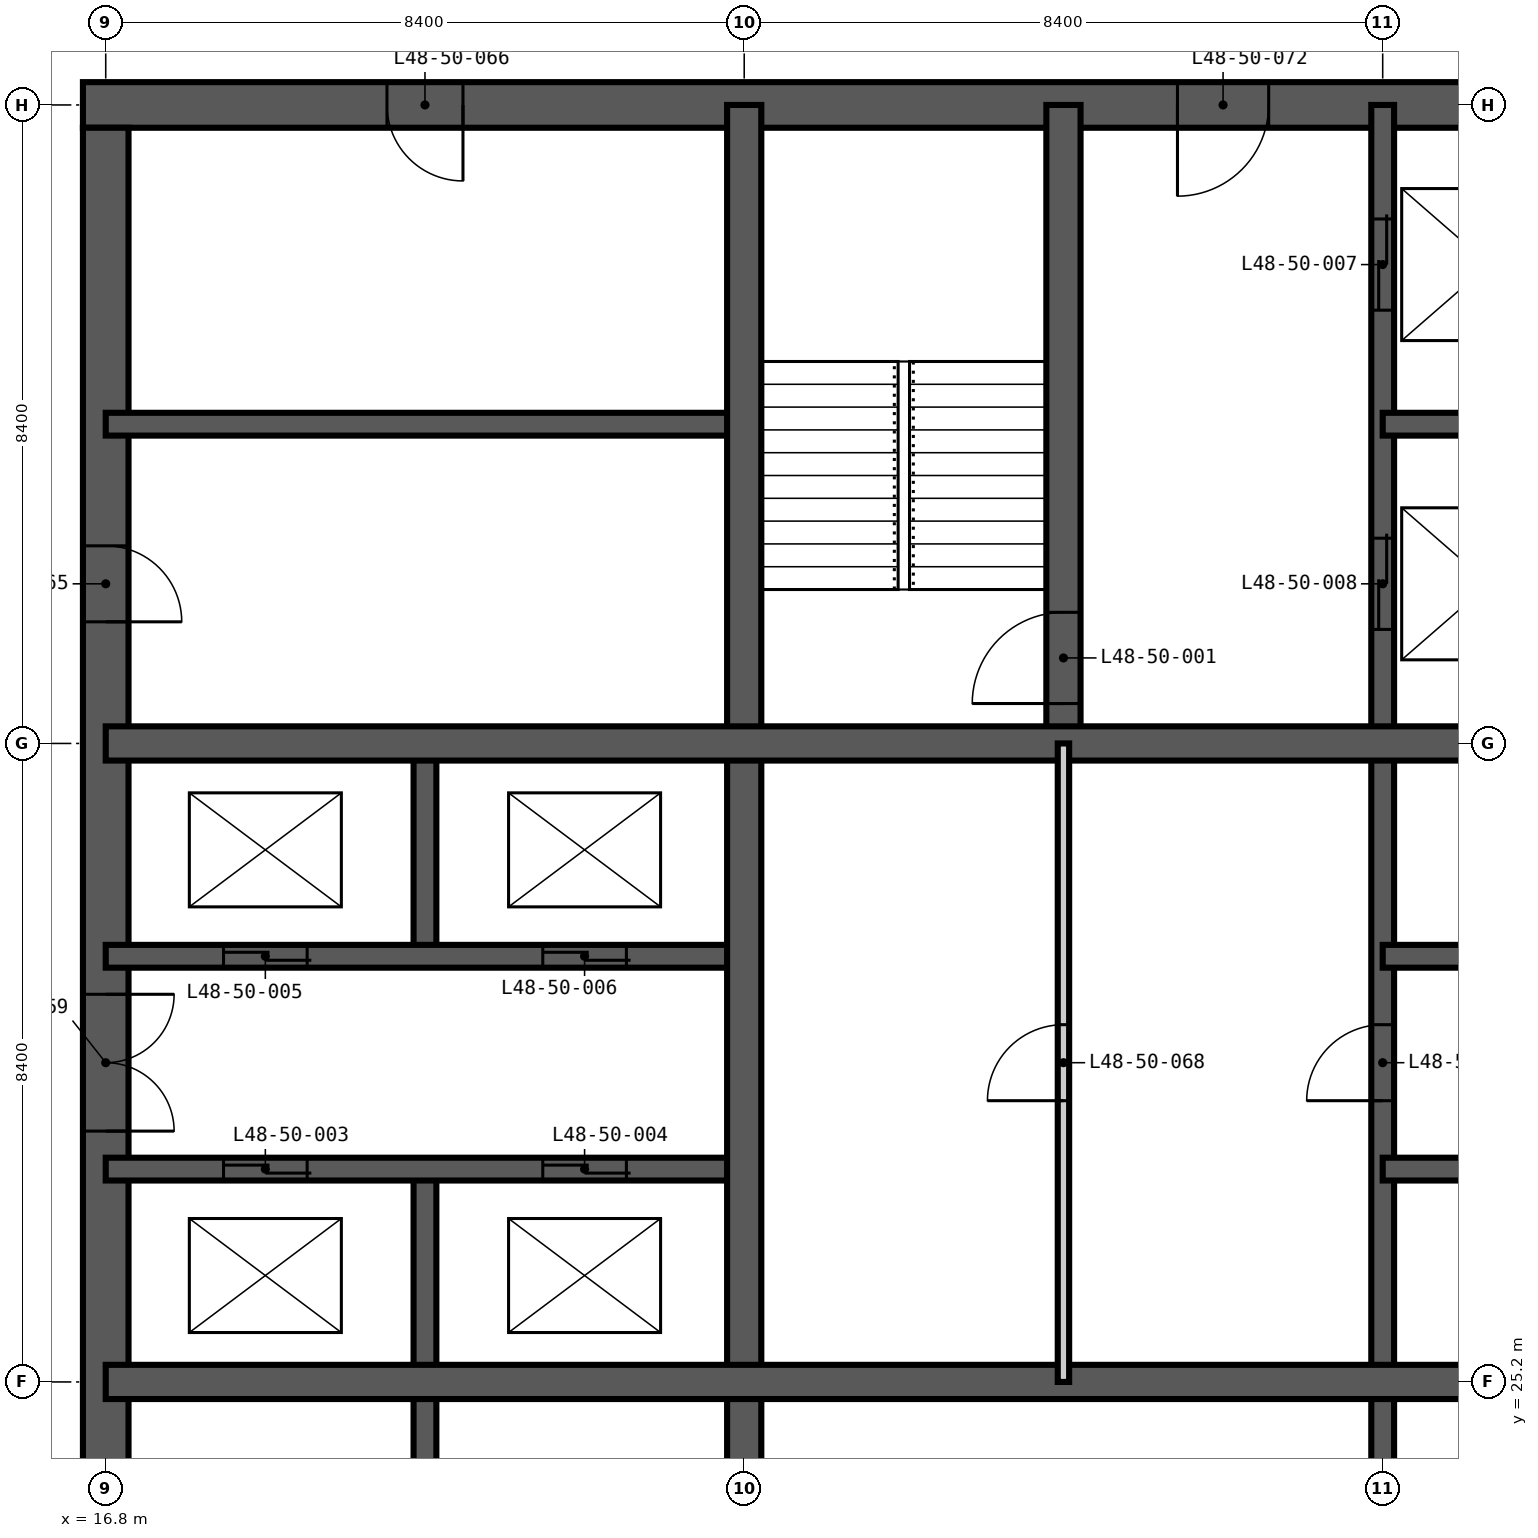
"""IFC4 building model, lengths in metres.
Left out: names, types, materials, properties, quantities, classifications, styles, units other than length and angle.
Written with IfcOpenShell. Run it as: python <this file> out.ifc"""

import sys

from ifc_helpers import new_model, si_unit, direction, frame, frame_2d, origin, place, context, subcontext, project, spatial, rectangle, extrude, element, fill, save


model = new_model("IFC4")
c1 = context("Model", 3, precision=1e-05, world=origin(), true_north=direction((0.0, 1.0)))
c2 = subcontext(c1, "Body", "Model", "MODEL_VIEW")
j1 = project(units=[si_unit("LENGTHUNIT", "METRE"), si_unit("PLANEANGLEUNIT", "RADIAN")], contexts=[c1])
p1 = place(None, origin())
s1 = spatial("IfcSite", under=j1, at=p1, CompositionType="ELEMENT")
p2 = place(p1, origin())
s2 = spatial("IfcBuilding", under=s1, at=p2, CompositionType="ELEMENT")
p3 = place(p2, frame((0.0, 0.0, 187.8)))
s3 = spatial("IfcBuildingStorey", under=s2, at=p3, CompositionType="ELEMENT", Elevation=187.8)
p4 = place(p3, frame((42.3, 42.0, -0.35), z_axis=(0.0, 0.0, 1.0), x_axis=(-1.0, 0.0, 0.0)))
e1 = element("IfcWall", 1, at=p4, inside=s3, PredefinedType="SHEAR", context=c2, shape_type="SweptSolid", body=[
    extrude(rectangle(XDim=25.8, YDim=0.6, at=frame_2d((12.9, 0.0))), origin(), (0.0, 0.0, 1.0), 3.6),
])
p5 = place(p4, frame((20.8, 0.0, 0.35)))
e2 = element("IfcOpeningElement", 2, at=p5, cuts=e1, PredefinedType="OPENING", context=c2, shape_type="SweptSolid", body=[
    extrude(rectangle(XDim=1.0, YDim=2.1, at=frame_2d((0.5, 1.05))), frame((0.0, 0.31, 0.0), z_axis=(0.0, -1.0, 0.0), x_axis=(1.0, 0.0, 0.0)), (0.0, 0.0, 1.0), 0.62),
])
p6 = place(p4, frame((10.2, 0.0, 0.35)))
e3 = element("IfcOpeningElement", 3, at=p6, cuts=e1, PredefinedType="OPENING", context=c2, shape_type="SweptSolid", body=[
    extrude(rectangle(XDim=1.2, YDim=2.2, at=frame_2d((0.6, 1.1))), frame((0.0, 0.31, 0.0), z_axis=(0.0, -1.0, 0.0), x_axis=(1.0, 0.0, 0.0)), (0.0, 0.0, 1.0), 0.62),
])
p7 = place(p3, frame((16.8, 41.7, -0.35), z_axis=(0.0, 0.0, 1.0), x_axis=(0.0, -1.0, 0.0)))
e4 = element("IfcWall", 4, at=p7, inside=s3, PredefinedType="SHEAR", context=c2, shape_type="SweptSolid", body=[
    extrude(rectangle(XDim=24.6, YDim=0.6, at=frame_2d((12.3, 0.0))), origin(), (0.0, 0.0, 1.0), 3.6),
])
p8 = place(p7, frame((11.4, 0.0, 0.35)))
e5 = element("IfcOpeningElement", 5, at=p8, cuts=e4, PredefinedType="OPENING", context=c2, shape_type="SweptSolid", body=[
    extrude(rectangle(XDim=1.8, YDim=2.2, at=frame_2d((0.9, 1.1))), frame((0.0, 0.31, 0.0), z_axis=(0.0, -1.0, 0.0), x_axis=(1.0, 0.0, 0.0)), (0.0, 0.0, 1.0), 0.62),
])
p9 = place(p7, frame((20.2, 0.0, 0.35)))
e6 = element("IfcOpeningElement", 6, at=p9, cuts=e4, PredefinedType="OPENING", context=c2, shape_type="SweptSolid", body=[
    extrude(rectangle(XDim=1.0, YDim=2.1, at=frame_2d((0.5, 1.05))), frame((0.0, 0.31, 0.0), z_axis=(0.0, -1.0, 0.0), x_axis=(1.0, 0.0, 0.0)), (0.0, 0.0, 1.0), 0.62),
])
p10 = place(p7, frame((5.5, 0.0, 0.35)))
e7 = element("IfcOpeningElement", 7, at=p10, cuts=e4, PredefinedType="OPENING", context=c2, shape_type="SweptSolid", body=[
    extrude(rectangle(XDim=1.0, YDim=2.1, at=frame_2d((0.5, 1.05))), frame((0.0, 0.31, 0.0), z_axis=(0.0, -1.0, 0.0), x_axis=(1.0, 0.0, 0.0)), (0.0, 0.0, 1.0), 0.62),
])
p11 = place(p3, frame((21.0, 22.4, -0.35), z_axis=(0.0, 0.0, 1.0), x_axis=(0.0, 1.0, 0.0)))
e8 = element("IfcWall", 8, at=p11, inside=s3, PredefinedType="SHEAR", context=c2, shape_type="SweptSolid", body=[
    extrude(rectangle(XDim=5.6, YDim=0.3, at=frame_2d((2.8, 0.0))), origin(), (0.0, 0.0, 1.0), 3.6),
])
p12 = place(p3, frame((21.0, 30.8, -0.35), z_axis=(0.0, 0.0, 1.0), x_axis=(0.0, 1.0, 0.0)))
e9 = element("IfcWall", 9, at=p12, inside=s3, PredefinedType="SHEAR", context=c2, shape_type="SweptSolid", body=[
    extrude(rectangle(XDim=2.8, YDim=0.3, at=frame_2d((1.4, 0.0))), origin(), (0.0, 0.0, 1.0), 3.6),
])
p13 = place(p3, frame((33.6, 16.8, -0.35), z_axis=(0.0, 0.0, 1.0), x_axis=(0.0, 1.0, 0.0)))
e10 = element("IfcWall", 10, at=p13, inside=s3, PredefinedType="SHEAR", context=c2, shape_type="SweptSolid", body=[
    extrude(rectangle(XDim=25.2, YDim=0.3, at=frame_2d((12.6, 0.0))), origin(), (0.0, 0.0, 1.0), 3.6),
])
p14 = place(p13, frame((22.5, 0.0, 0.35)))
e11 = element("IfcOpeningElement", 11, at=p14, cuts=e10, PredefinedType="OPENING", context=c2, shape_type="SweptSolid", body=[
    extrude(rectangle(XDim=1.2, YDim=2.2, at=frame_2d((0.6, 1.1))), frame((0.0, 0.16, 0.0), z_axis=(0.0, -1.0, 0.0), x_axis=(1.0, 0.0, 0.0)), (0.0, 0.0, 1.0), 0.32),
])
p15 = place(p13, frame((18.3, 0.0, 0.35)))
e12 = element("IfcOpeningElement", 12, at=p15, cuts=e10, PredefinedType="OPENING", context=c2, shape_type="SweptSolid", body=[
    extrude(rectangle(XDim=1.2, YDim=2.2, at=frame_2d((0.6, 1.1))), frame((0.0, 0.16, 0.0), z_axis=(0.0, -1.0, 0.0), x_axis=(1.0, 0.0, 0.0)), (0.0, 0.0, 1.0), 0.32),
])
p16 = place(p13, frame((12.1, 0.0, 0.35)))
e13 = element("IfcOpeningElement", 13, at=p16, cuts=e10, PredefinedType="OPENING", context=c2, shape_type="SweptSolid", body=[
    extrude(rectangle(XDim=1.0, YDim=2.1, at=frame_2d((0.5, 1.05))), frame((0.0, 0.16, 0.0), z_axis=(0.0, -1.0, 0.0), x_axis=(1.0, 0.0, 0.0)), (0.0, 0.0, 1.0), 0.32),
])
p17 = place(p3, frame((16.8, 28.0, -0.35), z_axis=(0.0, 0.0, 1.0), x_axis=(1.0, 0.0, 0.0)))
e14 = element("IfcWall", 14, at=p17, inside=s3, PredefinedType="SHEAR", context=c2, shape_type="SweptSolid", body=[
    extrude(rectangle(XDim=8.4, YDim=0.3, at=frame_2d((4.2, 0.0))), origin(), (0.0, 0.0, 1.0), 3.6),
])
p18 = place(p17, frame((1.55, 0.0, 0.35)))
e15 = element("IfcOpeningElement", 15, at=p18, cuts=e14, PredefinedType="OPENING", context=c2, shape_type="SweptSolid", body=[
    extrude(rectangle(XDim=1.1, YDim=2.2, at=frame_2d((0.55, 1.1))), frame((0.0, 0.16, 0.0), z_axis=(0.0, -1.0, 0.0), x_axis=(1.0, 0.0, 0.0)), (0.0, 0.0, 1.0), 0.32),
])
p19 = place(p17, frame((5.75, 0.0, 0.35)))
e16 = element("IfcOpeningElement", 16, at=p19, cuts=e14, PredefinedType="OPENING", context=c2, shape_type="SweptSolid", body=[
    extrude(rectangle(XDim=1.1, YDim=2.2, at=frame_2d((0.55, 1.1))), frame((0.0, 0.16, 0.0), z_axis=(0.0, -1.0, 0.0), x_axis=(1.0, 0.0, 0.0)), (0.0, 0.0, 1.0), 0.32),
])
p20 = place(p3, frame((33.6, 28.0, -0.35), z_axis=(0.0, 0.0, 1.0), x_axis=(1.0, 0.0, 0.0)))
e17 = element("IfcWall", 17, at=p20, inside=s3, PredefinedType="SHEAR", context=c2, shape_type="SweptSolid", body=[
    extrude(rectangle(XDim=8.4, YDim=0.3, at=frame_2d((4.2, 0.0))), origin(), (0.0, 0.0, 1.0), 3.6),
])
p21 = place(p20, frame((1.6, 0.0, 0.35)))
e18 = element("IfcOpeningElement", 18, at=p21, cuts=e17, PredefinedType="OPENING", context=c2, shape_type="SweptSolid", body=[
    extrude(rectangle(XDim=1.0, YDim=2.1, at=frame_2d((0.5, 1.05))), frame((0.0, 0.16, 0.0), z_axis=(0.0, -1.0, 0.0), x_axis=(1.0, 0.0, 0.0)), (0.0, 0.0, 1.0), 0.32),
])
p22 = place(p20, frame((4.6, 0.0, 0.35)))
e19 = element("IfcOpeningElement", 19, at=p22, cuts=e17, PredefinedType="OPENING", context=c2, shape_type="SweptSolid", body=[
    extrude(rectangle(XDim=1.0, YDim=2.1, at=frame_2d((0.5, 1.05))), frame((0.0, 0.16, 0.0), z_axis=(0.0, -1.0, 0.0), x_axis=(1.0, 0.0, 0.0)), (0.0, 0.0, 1.0), 0.32),
])
p23 = place(p3, frame((16.8, 30.8, -0.35), z_axis=(0.0, 0.0, 1.0), x_axis=(1.0, 0.0, 0.0)))
e20 = element("IfcWall", 20, at=p23, inside=s3, PredefinedType="SHEAR", context=c2, shape_type="SweptSolid", body=[
    extrude(rectangle(XDim=8.4, YDim=0.3, at=frame_2d((4.2, 0.0))), origin(), (0.0, 0.0, 1.0), 3.6),
])
p24 = place(p23, frame((1.55, 0.0, 0.35)))
e21 = element("IfcOpeningElement", 21, at=p24, cuts=e20, PredefinedType="OPENING", context=c2, shape_type="SweptSolid", body=[
    extrude(rectangle(XDim=1.1, YDim=2.2, at=frame_2d((0.55, 1.1))), frame((0.0, 0.16, 0.0), z_axis=(0.0, -1.0, 0.0), x_axis=(1.0, 0.0, 0.0)), (0.0, 0.0, 1.0), 0.32),
])
p25 = place(p23, frame((5.75, 0.0, 0.35)))
e22 = element("IfcOpeningElement", 22, at=p25, cuts=e20, PredefinedType="OPENING", context=c2, shape_type="SweptSolid", body=[
    extrude(rectangle(XDim=1.1, YDim=2.2, at=frame_2d((0.55, 1.1))), frame((0.0, 0.16, 0.0), z_axis=(0.0, -1.0, 0.0), x_axis=(1.0, 0.0, 0.0)), (0.0, 0.0, 1.0), 0.32),
])
for number, where, z_axis, x_axis in (
    (23, (33.6, 30.8, -0.35), (0.0, 0.0, 1.0), (1.0, 0.0, 0.0)),
    (24, (16.8, 37.8, -0.35), (0.0, 0.0, 1.0), (1.0, 0.0, 0.0)),
):
    element("IfcWall", number, at=place(p3, frame(where, z_axis=z_axis, x_axis=x_axis)), inside=s3, PredefinedType="SHEAR", context=c2, shape_type="SweptSolid", body=[
        extrude(rectangle(XDim=8.4, YDim=0.3, at=frame_2d((4.2, 0.0))), origin(), (0.0, 0.0, 1.0), 3.6),
    ])
p26 = place(p3, frame((33.6, 37.8, -0.35), z_axis=(0.0, 0.0, 1.0), x_axis=(1.0, 0.0, 0.0)))
e25 = element("IfcWall", 25, at=p26, inside=s3, PredefinedType="SHEAR", context=c2, shape_type="SweptSolid", body=[
    extrude(rectangle(XDim=2.8, YDim=0.3, at=frame_2d((1.4, 0.0))), origin(), (0.0, 0.0, 1.0), 3.6),
])
p27 = place(p3, frame((25.2, 16.8, -0.35), z_axis=(0.0, 0.0, 1.0), x_axis=(0.0, 1.0, 0.0)))
e26 = element("IfcWall", 26, at=p27, inside=s3, PredefinedType="SHEAR", context=c2, shape_type="SweptSolid", body=[
    extrude(rectangle(XDim=25.2, YDim=0.45, at=frame_2d((12.6, 0.0))), origin(), (0.0, 0.0, 1.0), 3.6),
])
p28 = place(p3, frame((29.4, 33.6, -0.35), z_axis=(0.0, 0.0, 1.0), x_axis=(0.0, 1.0, 0.0)))
e27 = element("IfcWall", 27, at=p28, inside=s3, PredefinedType="SHEAR", context=c2, shape_type="SweptSolid", body=[
    extrude(rectangle(XDim=8.4, YDim=0.45, at=frame_2d((4.2, 0.0))), origin(), (0.0, 0.0, 1.0), 3.6),
])
p29 = place(p28, frame((0.525, 0.0, 0.35)))
e28 = element("IfcOpeningElement", 28, at=p29, cuts=e27, PredefinedType="OPENING", context=c2, shape_type="SweptSolid", body=[
    extrude(rectangle(XDim=1.2, YDim=2.2, at=frame_2d((0.6, 1.1))), frame((0.0, 0.235, 0.0), z_axis=(0.0, -1.0, 0.0), x_axis=(1.0, 0.0, 0.0)), (0.0, 0.0, 1.0), 0.47),
])
for number, where, z_axis, x_axis in (
    (29, (16.8, 25.2, -0.35), (0.0, 0.0, 1.0), (1.0, 0.0, 0.0)),
    (30, (16.8, 33.6, -0.35), (0.0, 0.0, 1.0), (1.0, 0.0, 0.0)),
):
    element("IfcWall", number, at=place(p3, frame(where, z_axis=z_axis, x_axis=x_axis)), inside=s3, PredefinedType="SHEAR", context=c2, shape_type="SweptSolid", body=[
        extrude(rectangle(XDim=25.2, YDim=0.45, at=frame_2d((12.6, 0.0))), origin(), (0.0, 0.0, 1.0), 3.6),
    ])
p30 = place(p3, frame((29.4, 25.2, 0.0), z_axis=(0.0, 0.0, 1.0), x_axis=(0.0, 1.0, 0.0)))
e31 = element("IfcWall", 31, at=p30, inside=s3, PredefinedType="PARTITIONING", context=c2, shape_type="SweptSolid", body=[
    extrude(rectangle(XDim=8.4, YDim=0.15, at=frame_2d((4.2, 0.0))), origin(), (0.0, 0.0, 1.0), 3.25),
])
p31 = place(p30, frame((3.7, 0.0, 0.0)))
e32 = element("IfcOpeningElement", 32, at=p31, cuts=e31, PredefinedType="OPENING", context=c2, shape_type="SweptSolid", body=[
    extrude(rectangle(XDim=1.0, YDim=2.1, at=frame_2d((0.5, 1.05))), frame((0.0, 0.085, 0.0), z_axis=(0.0, -1.0, 0.0), x_axis=(1.0, 0.0, 0.0)), (0.0, 0.0, 1.0), 0.17),
])
p32 = place(p29, origin())
e33 = element("IfcDoor", 33, at=p32, inside=s3, OperationType="SINGLE_SWING_LEFT", PredefinedType="DOOR", context=c2, shape_type="SweptSolid", body=[
    extrude(rectangle(XDim=1.2, YDim=2.2, at=frame_2d((0.6, 1.1))), frame((0.0, 0.025, 0.0), z_axis=(0.0, -1.0, 0.0), x_axis=(1.0, 0.0, 0.0)), (0.0, 0.0, 1.0), 0.05),
])
fill(e28, e33)
p33 = place(p18, origin())
e34 = element("IfcDoor", 34, at=p33, inside=s3, OperationType="DOUBLE_DOOR_SLIDING", PredefinedType="DOOR", context=c2, shape_type="SweptSolid", body=[
    extrude(rectangle(XDim=1.1, YDim=2.2, at=frame_2d((0.55, 1.1))), frame((0.0, 0.025, 0.0), z_axis=(0.0, -1.0, 0.0), x_axis=(1.0, 0.0, 0.0)), (0.0, 0.0, 1.0), 0.05),
])
fill(e15, e34)
p34 = place(p19, origin())
e35 = element("IfcDoor", 35, at=p34, inside=s3, OperationType="DOUBLE_DOOR_SLIDING", PredefinedType="DOOR", context=c2, shape_type="SweptSolid", body=[
    extrude(rectangle(XDim=1.1, YDim=2.2, at=frame_2d((0.55, 1.1))), frame((0.0, 0.025, 0.0), z_axis=(0.0, -1.0, 0.0), x_axis=(1.0, 0.0, 0.0)), (0.0, 0.0, 1.0), 0.05),
])
fill(e16, e35)
p35 = place(p24, origin())
e36 = element("IfcDoor", 36, at=p35, inside=s3, OperationType="DOUBLE_DOOR_SLIDING", PredefinedType="DOOR", context=c2, shape_type="SweptSolid", body=[
    extrude(rectangle(XDim=1.1, YDim=2.2, at=frame_2d((0.55, 1.1))), frame((0.0, 0.025, 0.0), z_axis=(0.0, -1.0, 0.0), x_axis=(1.0, 0.0, 0.0)), (0.0, 0.0, 1.0), 0.05),
])
fill(e21, e36)
p36 = place(p25, origin())
e37 = element("IfcDoor", 37, at=p36, inside=s3, OperationType="DOUBLE_DOOR_SLIDING", PredefinedType="DOOR", context=c2, shape_type="SweptSolid", body=[
    extrude(rectangle(XDim=1.1, YDim=2.2, at=frame_2d((0.55, 1.1))), frame((0.0, 0.025, 0.0), z_axis=(0.0, -1.0, 0.0), x_axis=(1.0, 0.0, 0.0)), (0.0, 0.0, 1.0), 0.05),
])
fill(e22, e37)
p37 = place(p14, origin())
e38 = element("IfcDoor", 38, at=p37, inside=s3, OperationType="DOUBLE_DOOR_SLIDING", PredefinedType="DOOR", context=c2, shape_type="SweptSolid", body=[
    extrude(rectangle(XDim=1.2, YDim=2.2, at=frame_2d((0.6, 1.1))), frame((0.0, 0.025, 0.0), z_axis=(0.0, -1.0, 0.0), x_axis=(1.0, 0.0, 0.0)), (0.0, 0.0, 1.0), 0.05),
])
fill(e11, e38)
p38 = place(p15, origin())
e39 = element("IfcDoor", 39, at=p38, inside=s3, OperationType="DOUBLE_DOOR_SLIDING", PredefinedType="DOOR", context=c2, shape_type="SweptSolid", body=[
    extrude(rectangle(XDim=1.2, YDim=2.2, at=frame_2d((0.6, 1.1))), frame((0.0, 0.025, 0.0), z_axis=(0.0, -1.0, 0.0), x_axis=(1.0, 0.0, 0.0)), (0.0, 0.0, 1.0), 0.05),
])
fill(e12, e39)
p39 = place(p8, origin())
e40 = element("IfcDoor", 40, at=p39, inside=s3, OperationType="DOUBLE_DOOR_DOUBLE_SWING", PredefinedType="DOOR", context=c2, shape_type="SweptSolid", body=[
    extrude(rectangle(XDim=1.8, YDim=2.2, at=frame_2d((0.9, 1.1))), frame((0.0, 0.025, 0.0), z_axis=(0.0, -1.0, 0.0), x_axis=(1.0, 0.0, 0.0)), (0.0, 0.0, 1.0), 0.05),
])
fill(e5, e40)
p40 = place(p10, origin())
e41 = element("IfcDoor", 41, at=p40, inside=s3, OperationType="SINGLE_SWING_RIGHT", PredefinedType="DOOR", context=c2, shape_type="SweptSolid", body=[
    extrude(rectangle(XDim=1.0, YDim=2.1, at=frame_2d((0.5, 1.05))), frame((0.0, 0.025, 0.0), z_axis=(0.0, -1.0, 0.0), x_axis=(1.0, 0.0, 0.0)), (0.0, 0.0, 1.0), 0.05),
])
fill(e7, e41)
p41 = place(p5, origin())
e42 = element("IfcDoor", 42, at=p41, inside=s3, OperationType="SINGLE_SWING_LEFT", PredefinedType="DOOR", context=c2, shape_type="SweptSolid", body=[
    extrude(rectangle(XDim=1.0, YDim=2.1, at=frame_2d((0.5, 1.05))), frame((0.0, 0.025, 0.0), z_axis=(0.0, -1.0, 0.0), x_axis=(1.0, 0.0, 0.0)), (0.0, 0.0, 1.0), 0.05),
])
fill(e2, e42)
p42 = place(p16, origin())
e43 = element("IfcDoor", 43, at=p42, inside=s3, OperationType="SINGLE_SWING_LEFT", PredefinedType="DOOR", context=c2, shape_type="SweptSolid", body=[
    extrude(rectangle(XDim=1.0, YDim=2.1, at=frame_2d((0.5, 1.05))), frame((0.0, 0.025, 0.0), z_axis=(0.0, -1.0, 0.0), x_axis=(1.0, 0.0, 0.0)), (0.0, 0.0, 1.0), 0.05),
])
fill(e13, e43)
p43 = place(p31, origin())
e44 = element("IfcDoor", 44, at=p43, inside=s3, OperationType="SINGLE_SWING_LEFT", PredefinedType="DOOR", context=c2, shape_type="SweptSolid", body=[
    extrude(rectangle(XDim=1.0, YDim=2.1, at=frame_2d((0.5, 1.05))), frame((0.0, 0.025, 0.0), z_axis=(0.0, -1.0, 0.0), x_axis=(1.0, 0.0, 0.0)), (0.0, 0.0, 1.0), 0.05),
])
fill(e32, e44)
p44 = place(p6, origin())
e45 = element("IfcDoor", 45, at=p44, inside=s3, OperationType="SINGLE_SWING_RIGHT", PredefinedType="DOOR", context=c2, shape_type="SweptSolid", body=[
    extrude(rectangle(XDim=1.2, YDim=2.2, at=frame_2d((0.6, 1.1))), frame((0.0, 0.025, 0.0), z_axis=(0.0, -1.0, 0.0), x_axis=(1.0, 0.0, 0.0)), (0.0, 0.0, 1.0), 0.05),
])
fill(e3, e45)
save(model, sys.argv[1])
